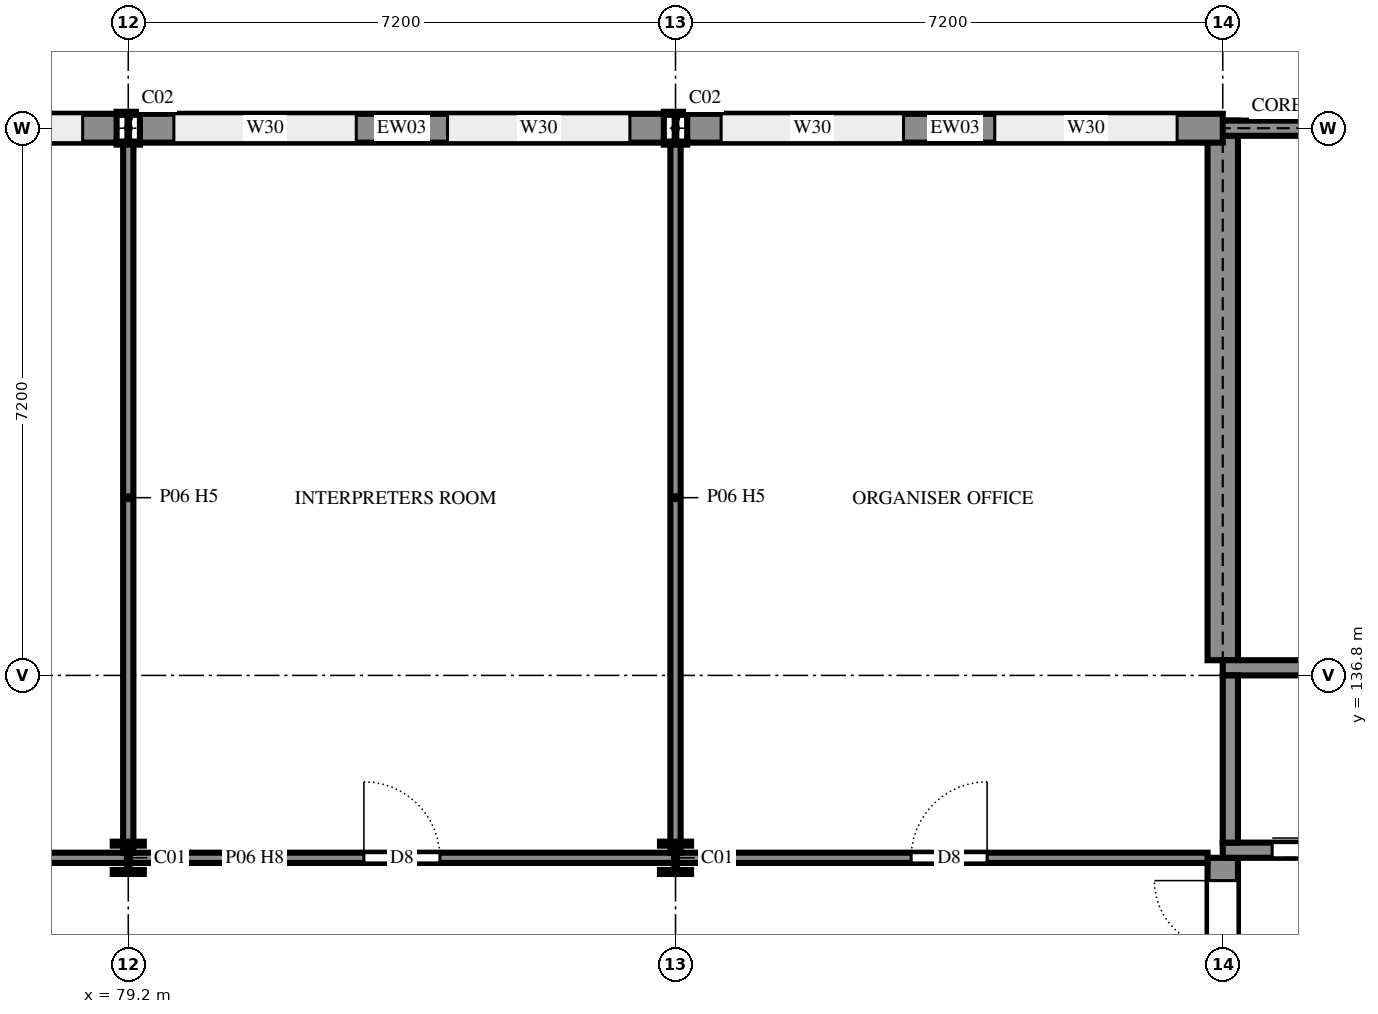
"""IFC4 building model, lengths in metres.
Left out: names, types, materials, properties, quantities, classifications, styles, units other than length and angle.
Written with IfcOpenShell. Run it as: python <this file> out.ifc"""

import sys

from ifc_helpers import new_model, si_unit, direction, frame, frame_2d, origin, origin_2d, place, context, subcontext, project, spatial, rectangle, i_section, extrude, element, fill, save


model = new_model("IFC4")
c1 = context("Model", 3, precision=1e-05, world=origin(), true_north=direction((0.0, 1.0)))
c2 = subcontext(c1, "Body", "Model", "MODEL_VIEW")
j1 = project(units=[si_unit("LENGTHUNIT", "METRE"), si_unit("PLANEANGLEUNIT", "RADIAN")], contexts=[c1])
p1 = place(None, origin())
s1 = spatial("IfcSite", under=j1, at=p1, CompositionType="ELEMENT")
p2 = place(p1, origin())
s2 = spatial("IfcBuilding", under=s1, at=p2, CompositionType="ELEMENT")
p3 = place(p2, frame((0.0, 0.0, 14.4)))
s3 = spatial("IfcBuildingStorey", under=s2, at=p3, CompositionType="ELEMENT", Elevation=14.4)
p4 = place(p3, frame((79.2, 134.4, 0.0), z_axis=(0.0, 0.0, 1.0), x_axis=(1.0, 0.0, 0.0)))
e1 = element("IfcColumn", 1, at=p4, inside=s3, PredefinedType="COLUMN", context=c2, shape_type="SweptSolid", body=[
    extrude(i_section(OverallWidth=0.409, OverallDepth=0.425, WebThickness=0.033, FlangeThickness=0.052, FilletRadius=0.015, at=origin_2d()), origin(), (0.0, 0.0, 1.0), 3.6),
])
p5 = place(p3, frame((79.2, 144.0, 0.0), z_axis=(0.0, 0.0, 1.0), x_axis=(1.0, 0.0, 0.0)))
e2 = element("IfcColumn", 2, at=p5, inside=s3, PredefinedType="COLUMN", context=c2, shape_type="SweptSolid", body=[
    extrude(i_section(OverallWidth=0.307, OverallDepth=0.432, WebThickness=0.021, FlangeThickness=0.04, FilletRadius=0.027, at=origin_2d()), origin(), (0.0, 0.0, 1.0), 3.6),
])
p6 = place(p3, frame((86.4, 134.4, 0.0), z_axis=(0.0, 0.0, 1.0), x_axis=(1.0, 0.0, 0.0)))
e3 = element("IfcColumn", 3, at=p6, inside=s3, PredefinedType="COLUMN", context=c2, shape_type="SweptSolid", body=[
    extrude(i_section(OverallWidth=0.409, OverallDepth=0.425, WebThickness=0.033, FlangeThickness=0.052, FilletRadius=0.015, at=origin_2d()), origin(), (0.0, 0.0, 1.0), 3.6),
])
p7 = place(p3, frame((86.4, 144.0, 0.0), z_axis=(0.0, 0.0, 1.0), x_axis=(1.0, 0.0, 0.0)))
e4 = element("IfcColumn", 4, at=p7, inside=s3, PredefinedType="COLUMN", context=c2, shape_type="SweptSolid", body=[
    extrude(i_section(OverallWidth=0.307, OverallDepth=0.432, WebThickness=0.021, FlangeThickness=0.04, FilletRadius=0.027, at=origin_2d()), origin(), (0.0, 0.0, 1.0), 3.6),
])
p8 = place(p3, frame((93.6, 132.0, 0.0), z_axis=(0.0, 0.0, 1.0), x_axis=(0.0, 1.0, 0.0)))
e5 = element("IfcWall", 5, at=p8, inside=s3, PredefinedType="SHEAR", context=c2, shape_type="SweptSolid", body=[
    extrude(rectangle(XDim=2.4, YDim=0.4, at=frame_2d((1.2, 0.0))), origin(), (0.0, 0.0, 1.0), 3.6),
])
p9 = place(p8, frame((0.3, 0.0, 0.0)))
e6 = element("IfcOpeningElement", 6, at=p9, cuts=e5, PredefinedType="OPENING", context=c2, shape_type="SweptSolid", body=[
    extrude(rectangle(XDim=1.8, YDim=2.1, at=frame_2d((0.9, 1.05))), frame((0.0, 0.21, 0.0), z_axis=(0.0, -1.0, 0.0), x_axis=(1.0, 0.0, 0.0)), (0.0, 0.0, 1.0), 0.42),
])
p10 = place(p3, frame((93.6, 144.1, 0.0), z_axis=(0.0, 0.0, 1.0), x_axis=(0.0, -1.0, 0.0)))
e7 = element("IfcWall", 7, at=p10, inside=s3, PredefinedType="SHEAR", context=c2, shape_type="SweptSolid", body=[
    extrude(rectangle(XDim=7.1, YDim=0.4, at=frame_2d((3.55, 0.0))), origin(), (0.0, 0.0, 1.0), 3.6),
])
p11 = place(p3, frame((100.975, 144.0, 0.0), z_axis=(0.0, 0.0, 1.0), x_axis=(-1.0, 0.0, 0.0)))
e8 = element("IfcWall", 8, at=p11, inside=s3, PredefinedType="SHEAR", context=c2, shape_type="SweptSolid", body=[
    extrude(rectangle(XDim=7.575, YDim=0.2, at=frame_2d((3.788, 0.0))), origin(), (0.0, 0.0, 1.0), 3.6),
])
p12 = place(p3, frame((93.6, 144.0, 0.0), z_axis=(0.0, 0.0, 1.0), x_axis=(-1.0, 0.0, 0.0)))
e9 = element("IfcWall", 9, at=p12, inside=s3, PredefinedType="SOLIDWALL", context=c2, shape_type="SweptSolid", body=[
    extrude(rectangle(XDim=7.047, YDim=0.38, at=frame_2d((3.523, 0.0))), origin(), (0.0, 0.0, 1.0), 3.16),
])
p13 = place(p12, frame((4.2, 0.0, 0.6)))
e10 = element("IfcOpeningElement", 10, at=p13, cuts=e9, PredefinedType="OPENING", context=c2, shape_type="SweptSolid", body=[
    extrude(rectangle(XDim=2.4, YDim=2.4, at=frame_2d((1.2, 1.2))), frame((0.0, 0.2, 0.0), z_axis=(0.0, -1.0, 0.0), x_axis=(1.0, 0.0, 0.0)), (0.0, 0.0, 1.0), 0.4),
])
p14 = place(p12, frame((0.6, 0.0, 0.6)))
e11 = element("IfcOpeningElement", 11, at=p14, cuts=e9, PredefinedType="OPENING", context=c2, shape_type="SweptSolid", body=[
    extrude(rectangle(XDim=2.4, YDim=2.4, at=frame_2d((1.2, 1.2))), frame((0.0, 0.2, 0.0), z_axis=(0.0, -1.0, 0.0), x_axis=(1.0, 0.0, 0.0)), (0.0, 0.0, 1.0), 0.4),
])
p15 = place(p3, frame((86.247, 144.0, 0.0), z_axis=(0.0, 0.0, 1.0), x_axis=(-1.0, 0.0, 0.0)))
e12 = element("IfcWall", 12, at=p15, inside=s3, PredefinedType="SOLIDWALL", context=c2, shape_type="SweptSolid", body=[
    extrude(rectangle(XDim=6.893, YDim=0.38, at=frame_2d((3.447, 0.0))), origin(), (0.0, 0.0, 1.0), 3.16),
])
p16 = place(p15, frame((4.046, 0.0, 0.6)))
e13 = element("IfcOpeningElement", 13, at=p16, cuts=e12, PredefinedType="OPENING", context=c2, shape_type="SweptSolid", body=[
    extrude(rectangle(XDim=2.4, YDim=2.4, at=frame_2d((1.2, 1.2))), frame((0.0, 0.2, 0.0), z_axis=(0.0, -1.0, 0.0), x_axis=(1.0, 0.0, 0.0)), (0.0, 0.0, 1.0), 0.4),
])
p17 = place(p15, frame((0.447, 0.0, 0.6)))
e14 = element("IfcOpeningElement", 14, at=p17, cuts=e12, PredefinedType="OPENING", context=c2, shape_type="SweptSolid", body=[
    extrude(rectangle(XDim=2.4, YDim=2.4, at=frame_2d((1.2, 1.2))), frame((0.0, 0.2, 0.0), z_axis=(0.0, -1.0, 0.0), x_axis=(1.0, 0.0, 0.0)), (0.0, 0.0, 1.0), 0.4),
])
p18 = place(p3, frame((79.046, 144.0, 0.0), z_axis=(0.0, 0.0, 1.0), x_axis=(-1.0, 0.0, 0.0)))
e15 = element("IfcWall", 15, at=p18, inside=s3, PredefinedType="SOLIDWALL", context=c2, shape_type="SweptSolid", body=[
    extrude(rectangle(XDim=6.893, YDim=0.38, at=frame_2d((3.446, 0.0))), origin(), (0.0, 0.0, 1.0), 3.16),
])
p19 = place(p18, frame((4.046, 0.0, 0.6)))
e16 = element("IfcOpeningElement", 16, at=p19, cuts=e15, PredefinedType="OPENING", context=c2, shape_type="SweptSolid", body=[
    extrude(rectangle(XDim=2.4, YDim=2.4, at=frame_2d((1.2, 1.2))), frame((0.0, 0.2, 0.0), z_axis=(0.0, -1.0, 0.0), x_axis=(1.0, 0.0, 0.0)), (0.0, 0.0, 1.0), 0.4),
])
p20 = place(p18, frame((0.447, 0.0, 0.6)))
e17 = element("IfcOpeningElement", 17, at=p20, cuts=e15, PredefinedType="OPENING", context=c2, shape_type="SweptSolid", body=[
    extrude(rectangle(XDim=2.4, YDim=2.4, at=frame_2d((1.2, 1.2))), frame((0.0, 0.2, 0.0), z_axis=(0.0, -1.0, 0.0), x_axis=(1.0, 0.0, 0.0)), (0.0, 0.0, 1.0), 0.4),
])
p21 = place(p3, frame((93.6, 134.5, 0.0), z_axis=(0.0, 0.0, 1.0), x_axis=(1.0, 0.0, 0.0)))
e18 = element("IfcWall", 18, at=p21, inside=s3, PredefinedType="SHEAR", context=c2, shape_type="SweptSolid", body=[
    extrude(rectangle(XDim=2.4, YDim=0.2, at=frame_2d((1.2, 0.0))), origin(), (0.0, 0.0, 1.0), 3.6),
])
p22 = place(p21, frame((0.65, 0.0, 0.0)))
e19 = element("IfcOpeningElement", 19, at=p22, cuts=e18, PredefinedType="OPENING", context=c2, shape_type="SweptSolid", body=[
    extrude(rectangle(XDim=1.1, YDim=2.1, at=frame_2d((0.55, 1.05))), frame((0.0, 0.11, 0.0), z_axis=(0.0, -1.0, 0.0), x_axis=(1.0, 0.0, 0.0)), (0.0, 0.0, 1.0), 0.22),
])
p23 = place(p3, frame((93.6, 136.9, 0.0), z_axis=(0.0, 0.0, 1.0), x_axis=(1.0, 0.0, 0.0)))
e20 = element("IfcWall", 20, at=p23, inside=s3, PredefinedType="SHEAR", context=c2, shape_type="SweptSolid", body=[
    extrude(rectangle(XDim=2.4, YDim=0.2, at=frame_2d((1.2, 0.0))), origin(), (0.0, 0.0, 1.0), 3.6),
])
p24 = place(p3, frame((93.7, 134.6, 0.0), z_axis=(0.0, 0.0, 1.0), x_axis=(0.0, 1.0, 0.0)))
e21 = element("IfcWall", 21, at=p24, inside=s3, PredefinedType="SHEAR", context=c2, shape_type="SweptSolid", body=[
    extrude(rectangle(XDim=2.2, YDim=0.2, at=frame_2d((1.1, 0.0))), origin(), (0.0, 0.0, 1.0), 3.6),
])
p25 = place(p3, frame((68.33, 134.4, 0.0), z_axis=(0.0, 0.0, 1.0), x_axis=(1.0, 0.0, 0.0)))
e22 = element("IfcWall", 22, at=p25, inside=s3, PredefinedType="PARTITIONING", context=c2, shape_type="SweptSolid", body=[
    extrude(rectangle(XDim=25.07, YDim=0.135, at=frame_2d((12.535, 0.0))), origin(), (0.0, 0.0, 1.0), 3.16),
])
p26 = place(p25, frame((4.97, 0.0, 0.0)))
e23 = element("IfcOpeningElement", 23, at=p26, cuts=e22, PredefinedType="OPENING", context=c2, shape_type="SweptSolid", body=[
    extrude(rectangle(XDim=1.0, YDim=2.4, at=frame_2d((0.5, 1.2))), frame((0.0, 0.077, 0.0), z_axis=(0.0, -1.0, 0.0), x_axis=(1.0, 0.0, 0.0)), (0.0, 0.0, 1.0), 0.155),
])
p27 = place(p25, frame((13.97, 0.0, 0.0)))
e24 = element("IfcOpeningElement", 24, at=p27, cuts=e22, PredefinedType="OPENING", context=c2, shape_type="SweptSolid", body=[
    extrude(rectangle(XDim=1.0, YDim=2.4, at=frame_2d((0.5, 1.2))), frame((0.0, 0.077, 0.0), z_axis=(0.0, -1.0, 0.0), x_axis=(1.0, 0.0, 0.0)), (0.0, 0.0, 1.0), 0.155),
])
p28 = place(p25, frame((21.17, 0.0, 0.0)))
e25 = element("IfcOpeningElement", 25, at=p28, cuts=e22, PredefinedType="OPENING", context=c2, shape_type="SweptSolid", body=[
    extrude(rectangle(XDim=1.0, YDim=2.4, at=frame_2d((0.5, 1.2))), frame((0.0, 0.077, 0.0), z_axis=(0.0, -1.0, 0.0), x_axis=(1.0, 0.0, 0.0)), (0.0, 0.0, 1.0), 0.155),
])
for number, where, z_axis, x_axis in (
    (26, (79.2, 134.468, 0.0), (0.0, 0.0, 1.0), (0.0, 1.0, 0.0)),
    (27, (86.4, 134.468, 0.0), (0.0, 0.0, 1.0), (0.0, 1.0, 0.0)),
):
    element("IfcWall", number, at=place(p3, frame(where, z_axis=z_axis, x_axis=x_axis)), inside=s3, PredefinedType="PARTITIONING", context=c2, shape_type="SweptSolid", body=[
        extrude(rectangle(XDim=9.343, YDim=0.135, at=frame_2d((4.671, 0.0))), origin(), (0.0, 0.0, 1.0), 3.06),
    ])
p29 = place(p13, origin())
e28 = element("IfcWindow", 28, at=p29, inside=s3, PartitioningType="SINGLE_PANEL", PredefinedType="WINDOW", context=c2, shape_type="SweptSolid", body=[
    extrude(rectangle(XDim=2.4, YDim=2.4, at=frame_2d((1.2, 1.2))), frame((0.0, 0.03, 0.0), z_axis=(0.0, -1.0, 0.0), x_axis=(1.0, 0.0, 0.0)), (0.0, 0.0, 1.0), 0.06),
])
fill(e10, e28)
p30 = place(p14, origin())
e29 = element("IfcWindow", 29, at=p30, inside=s3, PartitioningType="SINGLE_PANEL", PredefinedType="WINDOW", context=c2, shape_type="SweptSolid", body=[
    extrude(rectangle(XDim=2.4, YDim=2.4, at=frame_2d((1.2, 1.2))), frame((0.0, 0.03, 0.0), z_axis=(0.0, -1.0, 0.0), x_axis=(1.0, 0.0, 0.0)), (0.0, 0.0, 1.0), 0.06),
])
fill(e11, e29)
p31 = place(p16, origin())
e30 = element("IfcWindow", 30, at=p31, inside=s3, PartitioningType="SINGLE_PANEL", PredefinedType="WINDOW", context=c2, shape_type="SweptSolid", body=[
    extrude(rectangle(XDim=2.4, YDim=2.4, at=frame_2d((1.2, 1.2))), frame((0.0, 0.03, 0.0), z_axis=(0.0, -1.0, 0.0), x_axis=(1.0, 0.0, 0.0)), (0.0, 0.0, 1.0), 0.06),
])
fill(e13, e30)
p32 = place(p17, origin())
e31 = element("IfcWindow", 31, at=p32, inside=s3, PartitioningType="SINGLE_PANEL", PredefinedType="WINDOW", context=c2, shape_type="SweptSolid", body=[
    extrude(rectangle(XDim=2.4, YDim=2.4, at=frame_2d((1.2, 1.2))), frame((0.0, 0.03, 0.0), z_axis=(0.0, -1.0, 0.0), x_axis=(1.0, 0.0, 0.0)), (0.0, 0.0, 1.0), 0.06),
])
fill(e14, e31)
p33 = place(p20, origin())
e32 = element("IfcWindow", 32, at=p33, inside=s3, PartitioningType="SINGLE_PANEL", PredefinedType="WINDOW", context=c2, shape_type="SweptSolid", body=[
    extrude(rectangle(XDim=2.4, YDim=2.4, at=frame_2d((1.2, 1.2))), frame((0.0, 0.03, 0.0), z_axis=(0.0, -1.0, 0.0), x_axis=(1.0, 0.0, 0.0)), (0.0, 0.0, 1.0), 0.06),
])
fill(e17, e32)
p34 = place(p22, origin())
e33 = element("IfcDoor", 33, at=p34, inside=s3, OperationType="SLIDING_TO_LEFT", PredefinedType="DOOR", context=c2, shape_type="SweptSolid", body=[
    extrude(rectangle(XDim=1.1, YDim=2.1, at=frame_2d((0.55, 1.05))), frame((0.0, 0.025, 0.0), z_axis=(0.0, -1.0, 0.0), x_axis=(1.0, 0.0, 0.0)), (0.0, 0.0, 1.0), 0.05),
])
fill(e19, e33)
p35 = place(p27, origin())
e34 = element("IfcDoor", 34, at=p35, inside=s3, OperationType="SINGLE_SWING_RIGHT", PredefinedType="DOOR", context=c2, shape_type="SweptSolid", body=[
    extrude(rectangle(XDim=1.0, YDim=2.4, at=frame_2d((0.5, 1.2))), frame((0.0, 0.025, 0.0), z_axis=(0.0, -1.0, 0.0), x_axis=(1.0, 0.0, 0.0)), (0.0, 0.0, 1.0), 0.05),
])
fill(e24, e34)
p36 = place(p28, origin())
e35 = element("IfcDoor", 35, at=p36, inside=s3, OperationType="SINGLE_SWING_LEFT", PredefinedType="DOOR", context=c2, shape_type="SweptSolid", body=[
    extrude(rectangle(XDim=1.0, YDim=2.4, at=frame_2d((0.5, 1.2))), frame((0.0, 0.025, 0.0), z_axis=(0.0, -1.0, 0.0), x_axis=(1.0, 0.0, 0.0)), (0.0, 0.0, 1.0), 0.05),
])
fill(e25, e35)
p37 = place(p9, origin())
e36 = element("IfcDoor", 36, at=p37, inside=s3, OperationType="DOUBLE_DOOR_SINGLE_SWING", PredefinedType="DOOR", context=c2, shape_type="SweptSolid", body=[
    extrude(rectangle(XDim=1.8, YDim=2.1, at=frame_2d((0.9, 1.05))), frame((0.0, 0.025, 0.0), z_axis=(0.0, -1.0, 0.0), x_axis=(1.0, 0.0, 0.0)), (0.0, 0.0, 1.0), 0.05),
])
fill(e6, e36)
save(model, sys.argv[1])
